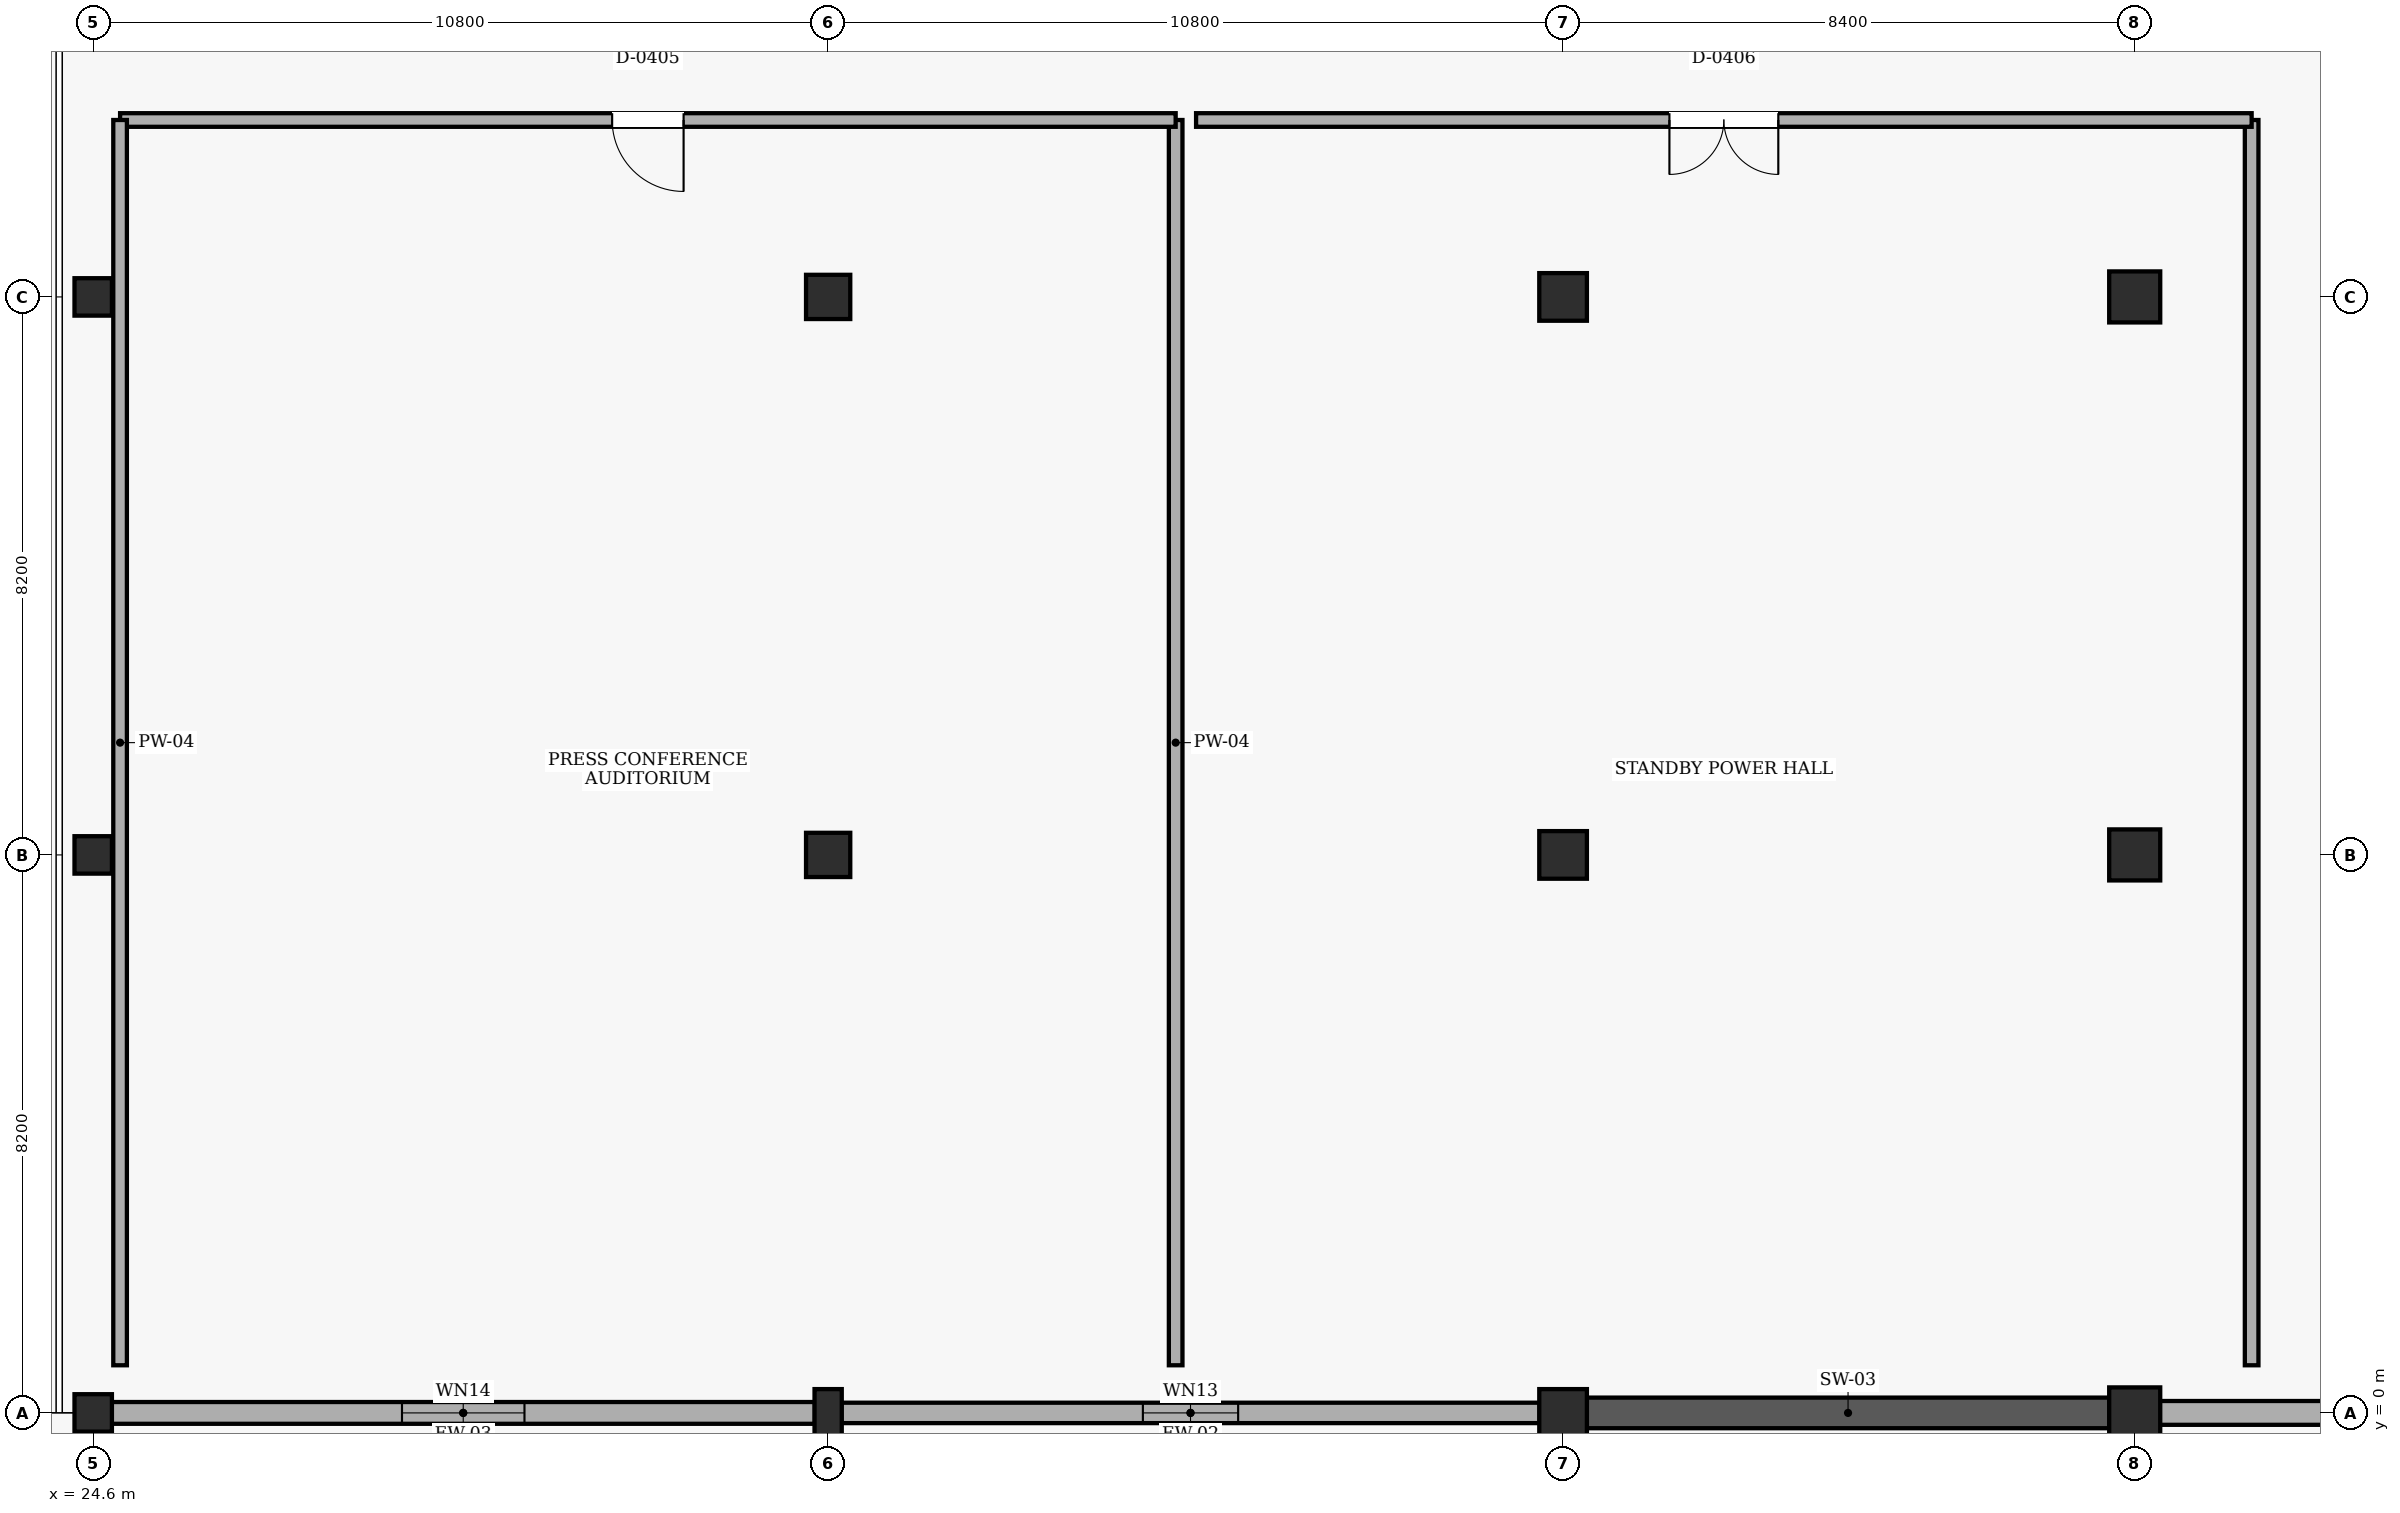
"""IFC4 building model, lengths in metres.
Left out: names, types, materials, properties, quantities, classifications, styles, units other than length and angle.
Written with IfcOpenShell. Run it as: python <this file> out.ifc"""

import sys

from ifc_helpers import new_model, si_unit, direction, frame, frame_2d, origin, origin_2d, place, context, subcontext, project, spatial, rectangle, extrude, element, fill, save


model = new_model("IFC4")
c1 = context("Model", 3, precision=1e-05, world=origin(), true_north=direction((0.0, 1.0)))
c2 = subcontext(c1, "Body", "Model", "MODEL_VIEW")
j1 = project(units=[si_unit("LENGTHUNIT", "METRE"), si_unit("PLANEANGLEUNIT", "RADIAN")], contexts=[c1])
p1 = place(None, origin())
s1 = spatial("IfcSite", under=j1, at=p1, CompositionType="ELEMENT")
p2 = place(p1, origin())
s2 = spatial("IfcBuilding", under=s1, at=p2, CompositionType="ELEMENT")
p3 = place(p2, origin())
s3 = spatial("IfcBuildingStorey", under=s2, at=p3, CompositionType="ELEMENT", Elevation=0.0)
for number, where, z_axis, x_axis in (
    (1, (24.6, 0.0, 0.0), (0.0, 0.0, 1.0), (1.0, 0.0, 0.0)),
    (2, (24.6, 8.2, 0.0), (0.0, 0.0, 1.0), (1.0, 0.0, 0.0)),
    (3, (24.6, 16.4, 0.0), (0.0, 0.0, 1.0), (1.0, 0.0, 0.0)),
):
    element("IfcColumn", number, at=place(p3, frame(where, z_axis=z_axis, x_axis=x_axis)), inside=s3, PredefinedType="COLUMN", context=c2, shape_type="SweptSolid", body=[
        extrude(rectangle(XDim=0.55, YDim=0.55, at=origin_2d()), origin(), (0.0, 0.0, 1.0), 5.4),
    ])
p4 = place(p3, frame((35.4, 0.0, 0.0), z_axis=(0.0, 0.0, 1.0), x_axis=(1.0, 0.0, 0.0)))
e4 = element("IfcColumn", 4, at=p4, inside=s3, PredefinedType="PILASTER", context=c2, shape_type="SweptSolid", body=[
    extrude(rectangle(XDim=0.4, YDim=0.7, at=origin_2d()), origin(), (0.0, 0.0, 1.0), 5.4),
])
for number, where, z_axis, x_axis in (
    (5, (35.4, 8.2, 0.0), (0.0, 0.0, 1.0), (1.0, 0.0, 0.0)),
    (6, (35.4, 16.4, 0.0), (0.0, 0.0, 1.0), (1.0, 0.0, 0.0)),
):
    element("IfcColumn", number, at=place(p3, frame(where, z_axis=z_axis, x_axis=x_axis)), inside=s3, PredefinedType="COLUMN", context=c2, shape_type="SweptSolid", body=[
        extrude(rectangle(XDim=0.65, YDim=0.65, at=origin_2d()), origin(), (0.0, 0.0, 1.0), 5.4),
    ])
for number, where, z_axis, x_axis in (
    (7, (46.2, 0.0, 0.0), (0.0, 0.0, 1.0), (1.0, 0.0, 0.0)),
    (8, (46.2, 8.2, 0.0), (0.0, 0.0, 1.0), (1.0, 0.0, 0.0)),
    (9, (46.2, 16.4, 0.0), (0.0, 0.0, 1.0), (1.0, 0.0, 0.0)),
):
    element("IfcColumn", number, at=place(p3, frame(where, z_axis=z_axis, x_axis=x_axis)), inside=s3, PredefinedType="COLUMN", context=c2, shape_type="SweptSolid", body=[
        extrude(rectangle(XDim=0.7, YDim=0.7, at=origin_2d()), origin(), (0.0, 0.0, 1.0), 5.4),
    ])
for number, where, z_axis, x_axis in (
    (10, (54.6, 0.0, 0.0), (0.0, 0.0, 1.0), (1.0, 0.0, 0.0)),
    (11, (54.6, 8.2, 0.0), (0.0, 0.0, 1.0), (1.0, 0.0, 0.0)),
    (12, (54.6, 16.4, 0.0), (0.0, 0.0, 1.0), (1.0, 0.0, 0.0)),
):
    element("IfcColumn", number, at=place(p3, frame(where, z_axis=z_axis, x_axis=x_axis)), inside=s3, PredefinedType="COLUMN", context=c2, shape_type="SweptSolid", body=[
        extrude(rectangle(XDim=0.75, YDim=0.75, at=origin_2d()), origin(), (0.0, 0.0, 1.0), 5.4),
    ])
p5 = place(p3, frame((63.38, 0.0, 0.0), z_axis=(0.0, 0.0, 1.0), x_axis=(-1.0, 0.0, 0.0)))
e13 = element("IfcWall", 13, at=p5, inside=s3, PredefinedType="SOLIDWALL", context=c2, shape_type="SweptSolid", body=[
    extrude(rectangle(XDim=8.41, YDim=0.35, at=frame_2d((4.205, 0.0))), origin(), (0.0, 0.0, 1.0), 4.21),
])
p6 = place(p5, frame((2.855, 0.0, 0.9)))
e14 = element("IfcOpeningElement", 14, at=p6, cuts=e13, PredefinedType="OPENING", context=c2, shape_type="SweptSolid", body=[
    extrude(rectangle(XDim=2.7, YDim=1.8, at=frame_2d((1.35, 0.9))), frame((0.0, 0.185, 0.0), z_axis=(0.0, -1.0, 0.0), x_axis=(1.0, 0.0, 0.0)), (0.0, 0.0, 1.0), 0.37),
])
p7 = place(p3, frame((54.23, 0.0, 0.0), z_axis=(0.0, 0.0, 1.0), x_axis=(-1.0, 0.0, 0.0)))
e15 = element("IfcWall", 15, at=p7, inside=s3, PredefinedType="SHEAR", context=c2, shape_type="SweptSolid", body=[
    extrude(rectangle(XDim=7.685, YDim=0.45, at=frame_2d((3.843, 0.0))), origin(), (0.0, 0.0, 1.0), 4.36),
])
p8 = place(p3, frame((45.855, 0.0, 0.0), z_axis=(0.0, 0.0, 1.0), x_axis=(-1.0, 0.0, 0.0)))
e16 = element("IfcWall", 16, at=p8, inside=s3, PredefinedType="SOLIDWALL", context=c2, shape_type="SweptSolid", body=[
    extrude(rectangle(XDim=10.26, YDim=0.3, at=frame_2d((5.13, 0.0))), origin(), (0.0, 0.0, 1.0), 4.26),
])
p9 = place(p8, frame((4.43, 0.0, 0.9)))
e17 = element("IfcOpeningElement", 17, at=p9, cuts=e16, PredefinedType="OPENING", context=c2, shape_type="SweptSolid", body=[
    extrude(rectangle(XDim=1.4, YDim=2.1, at=frame_2d((0.7, 1.05))), frame((0.0, 0.16, 0.0), z_axis=(0.0, -1.0, 0.0), x_axis=(1.0, 0.0, 0.0)), (0.0, 0.0, 1.0), 0.32),
])
p10 = place(p3, frame((35.205, 0.0, 0.0), z_axis=(0.0, 0.0, 1.0), x_axis=(-1.0, 0.0, 0.0)))
e18 = element("IfcWall", 18, at=p10, inside=s3, PredefinedType="SOLIDWALL", context=c2, shape_type="SweptSolid", body=[
    extrude(rectangle(XDim=10.335, YDim=0.32, at=frame_2d((5.167, 0.0))), origin(), (0.0, 0.0, 1.0), 4.26),
])
p11 = place(p10, frame((4.268, 0.0, 0.9)))
e19 = element("IfcOpeningElement", 19, at=p11, cuts=e18, PredefinedType="OPENING", context=c2, shape_type="SweptSolid", body=[
    extrude(rectangle(XDim=1.8, YDim=2.1, at=frame_2d((0.9, 1.05))), frame((0.0, 0.17, 0.0), z_axis=(0.0, -1.0, 0.0), x_axis=(1.0, 0.0, 0.0)), (0.0, 0.0, 1.0), 0.34),
])
p12 = place(p3, frame((40.507, 0.7, 0.0), z_axis=(0.0, 0.0, 1.0), x_axis=(0.0, 1.0, 0.0)))
e20 = element("IfcWall", 20, at=p12, inside=s3, PredefinedType="PARTITIONING", context=c2, shape_type="SweptSolid", body=[
    extrude(rectangle(XDim=18.3, YDim=0.2, at=frame_2d((9.15, 0.0))), origin(), (0.0, 0.0, 1.0), 5.08),
])
p13 = place(p3, frame((40.507, 19.0, 0.0), z_axis=(0.0, 0.0, 1.0), x_axis=(-1.0, 0.0, 0.0)))
e21 = element("IfcWall", 21, at=p13, inside=s3, PredefinedType="PARTITIONING", context=c2, shape_type="SweptSolid", body=[
    extrude(rectangle(XDim=15.511, YDim=0.2, at=frame_2d((7.756, 0.0))), origin(), (0.0, 0.0, 1.0), 5.08),
])
p14 = place(p13, frame((7.231, 0.0, 0.0)))
e22 = element("IfcOpeningElement", 22, at=p14, cuts=e21, PredefinedType="OPENING", context=c2, shape_type="SweptSolid", body=[
    extrude(rectangle(XDim=1.05, YDim=2.15, at=frame_2d((0.525, 1.075))), frame((0.0, 0.11, 0.0), z_axis=(0.0, -1.0, 0.0), x_axis=(1.0, 0.0, 0.0)), (0.0, 0.0, 1.0), 0.22),
])
p15 = place(p3, frame((24.995, 19.0, 0.0), z_axis=(0.0, 0.0, 1.0), x_axis=(0.0, -1.0, 0.0)))
e23 = element("IfcWall", 23, at=p15, inside=s3, PredefinedType="PARTITIONING", context=c2, shape_type="SweptSolid", body=[
    extrude(rectangle(XDim=18.3, YDim=0.2, at=frame_2d((9.15, 0.0))), origin(), (0.0, 0.0, 1.0), 4.46),
])
p16 = place(p3, frame((56.318, 0.7, 0.0), z_axis=(0.0, 0.0, 1.0), x_axis=(0.0, 1.0, 0.0)))
e24 = element("IfcWall", 24, at=p16, inside=s3, PredefinedType="PARTITIONING", context=c2, shape_type="SweptSolid", body=[
    extrude(rectangle(XDim=18.3, YDim=0.2, at=frame_2d((9.15, 0.0))), origin(), (0.0, 0.0, 1.0), 5.08),
])
p17 = place(p3, frame((56.318, 19.0, 0.0), z_axis=(0.0, 0.0, 1.0), x_axis=(-1.0, 0.0, 0.0)))
e25 = element("IfcWall", 25, at=p17, inside=s3, PredefinedType="PARTITIONING", context=c2, shape_type="SweptSolid", body=[
    extrude(rectangle(XDim=15.512, YDim=0.2, at=frame_2d((7.756, 0.0))), origin(), (0.0, 0.0, 1.0), 5.08),
])
p18 = place(p17, frame((6.956, 0.0, 0.0)))
e26 = element("IfcOpeningElement", 26, at=p18, cuts=e25, PredefinedType="OPENING", context=c2, shape_type="SweptSolid", body=[
    extrude(rectangle(XDim=1.6, YDim=2.2, at=frame_2d((0.8, 1.1))), frame((0.0, 0.11, 0.0), z_axis=(0.0, -1.0, 0.0), x_axis=(1.0, 0.0, 0.0)), (0.0, 0.0, 1.0), 0.22),
])
p19 = place(p9, origin())
e27 = element("IfcWindow", 27, at=p19, inside=s3, PartitioningType="SINGLE_PANEL", PredefinedType="WINDOW", context=c2, shape_type="SweptSolid", body=[
    extrude(rectangle(XDim=1.4, YDim=2.1, at=frame_2d((0.7, 1.05))), frame((0.0, 0.03, 0.0), z_axis=(0.0, -1.0, 0.0), x_axis=(1.0, 0.0, 0.0)), (0.0, 0.0, 1.0), 0.06),
])
fill(e17, e27)
p20 = place(p11, origin())
e28 = element("IfcWindow", 28, at=p20, inside=s3, PartitioningType="SINGLE_PANEL", PredefinedType="WINDOW", context=c2, shape_type="SweptSolid", body=[
    extrude(rectangle(XDim=1.8, YDim=2.1, at=frame_2d((0.9, 1.05))), frame((0.0, 0.03, 0.0), z_axis=(0.0, -1.0, 0.0), x_axis=(1.0, 0.0, 0.0)), (0.0, 0.0, 1.0), 0.06),
])
fill(e19, e28)
p21 = place(p14, origin())
e29 = element("IfcDoor", 29, at=p21, inside=s3, OperationType="SINGLE_SWING_LEFT", PredefinedType="DOOR", context=c2, shape_type="SweptSolid", body=[
    extrude(rectangle(XDim=1.05, YDim=2.15, at=frame_2d((0.525, 1.075))), frame((0.0, 0.025, 0.0), z_axis=(0.0, -1.0, 0.0), x_axis=(1.0, 0.0, 0.0)), (0.0, 0.0, 1.0), 0.05),
])
fill(e22, e29)
p22 = place(p18, origin())
e30 = element("IfcDoor", 30, at=p22, inside=s3, OperationType="DOUBLE_DOOR_SINGLE_SWING", PredefinedType="DOOR", context=c2, shape_type="SweptSolid", body=[
    extrude(rectangle(XDim=1.6, YDim=2.2, at=frame_2d((0.8, 1.1))), frame((0.0, 0.025, 0.0), z_axis=(0.0, -1.0, 0.0), x_axis=(1.0, 0.0, 0.0)), (0.0, 0.0, 1.0), 0.05),
])
fill(e26, e30)
save(model, sys.argv[1])
